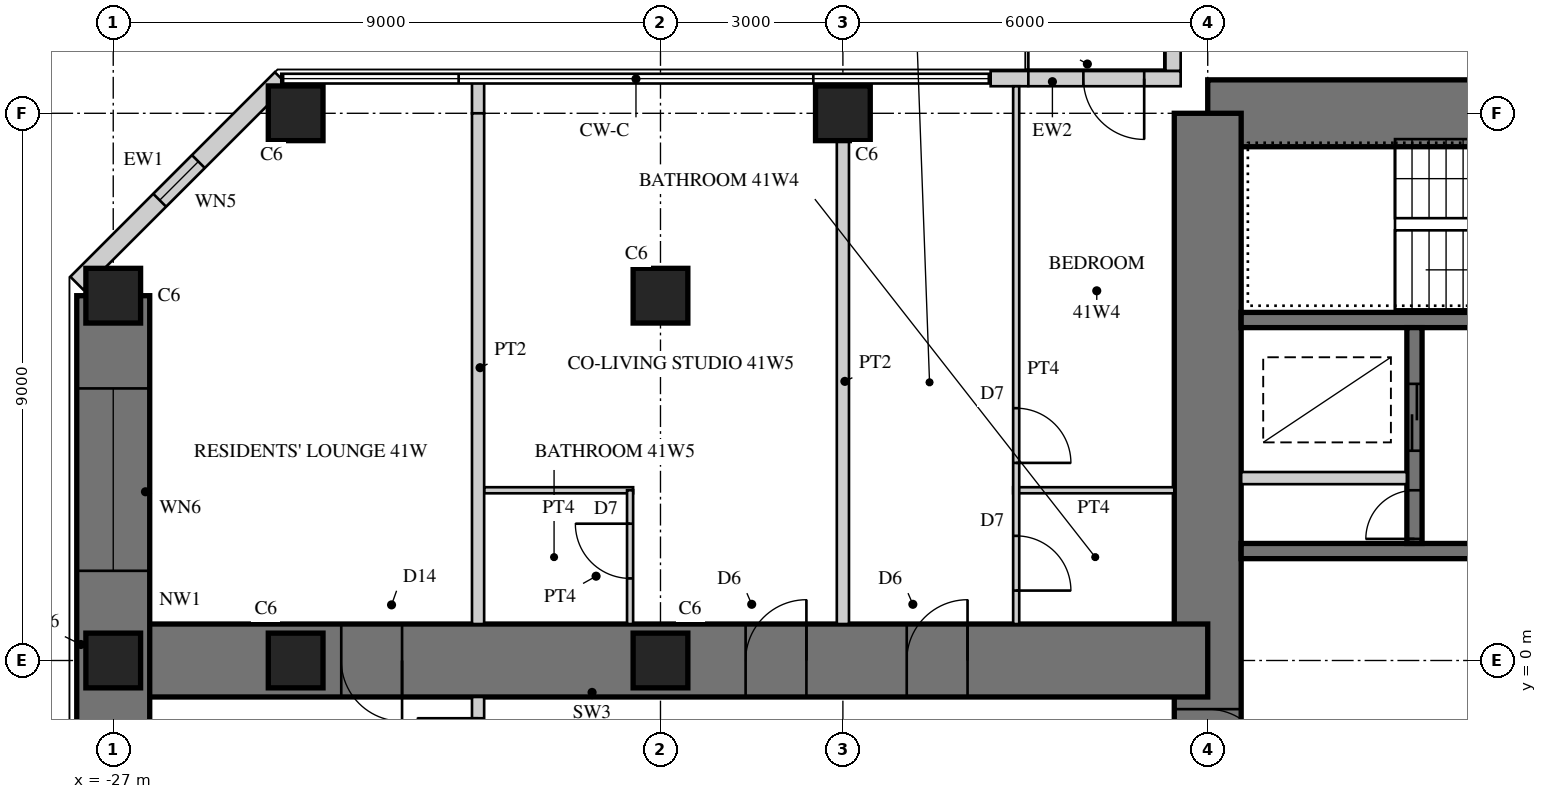
"""IFC4 building model, lengths in metres.
Left out: names, types, materials, properties, quantities, classifications, styles, units other than length and angle.
Written with IfcOpenShell. Run it as: python <this file> out.ifc"""

import sys

from ifc_helpers import new_model, si_unit, direction, frame, frame_2d, origin, origin_2d, place, context, subcontext, project, spatial, rectangle, hollow_rectangle, extrude, element, fill, save


model = new_model("IFC4")
c1 = context("Model", 3, precision=1e-05, world=origin(), true_north=direction((0.0, 1.0)))
c2 = subcontext(c1, "Body", "Model", "MODEL_VIEW")
j1 = project(units=[si_unit("LENGTHUNIT", "METRE"), si_unit("PLANEANGLEUNIT", "RADIAN")], contexts=[c1])
p1 = place(None, origin())
s1 = spatial("IfcSite", under=j1, at=p1, CompositionType="ELEMENT")
p2 = place(p1, origin())
s2 = spatial("IfcBuilding", under=s1, at=p2, CompositionType="ELEMENT")
p3 = place(p2, frame((0.0, 0.0, 169.5)))
s3 = spatial("IfcBuildingStorey", under=s2, at=p3, CompositionType="ELEMENT", Elevation=169.5)
p4 = place(p3, frame((9.0, 9.0, 0.0), z_axis=(0.0, 0.0, 1.0), x_axis=(-1.0, 0.0, 0.0)))
e1 = element("IfcWall", 1, at=p4, inside=s3, PredefinedType="SHEAR", context=c2, shape_type="SweptSolid", body=[
    extrude(rectangle(XDim=18.0, YDim=1.1, at=frame_2d((9.0, 0.0))), origin(), (0.0, 0.0, 1.0), 3.4),
])
p5 = place(p4, frame((9.8, 0.0, 0.0)))
e2 = element("IfcOpeningElement", 2, at=p5, cuts=e1, PredefinedType="OPENING", context=c2, shape_type="SweptSolid", body=[
    extrude(rectangle(XDim=1.0, YDim=2.4, at=frame_2d((0.5, 1.2))), frame((0.0, 0.56, 0.0), z_axis=(0.0, -1.0, 0.0), x_axis=(1.0, 0.0, 0.0)), (0.0, 0.0, 1.0), 1.12),
])
p6 = place(p3, frame((-9.0, 9.0, 0.0), z_axis=(0.0, 0.0, 1.0), x_axis=(0.0, -1.0, 0.0)))
e3 = element("IfcWall", 3, at=p6, inside=s3, PredefinedType="SHEAR", context=c2, shape_type="SweptSolid", body=[
    extrude(rectangle(XDim=18.0, YDim=1.1, at=frame_2d((9.0, 0.0))), origin(), (0.0, 0.0, 1.0), 3.4),
])
p7 = place(p6, frame((9.8, 0.0, 0.0)))
e4 = element("IfcOpeningElement", 4, at=p7, cuts=e3, PredefinedType="OPENING", context=c2, shape_type="SweptSolid", body=[
    extrude(rectangle(XDim=1.0, YDim=2.4, at=frame_2d((0.5, 1.2))), frame((0.0, 0.56, 0.0), z_axis=(0.0, -1.0, 0.0), x_axis=(1.0, 0.0, 0.0)), (0.0, 0.0, 1.0), 1.12),
])
p8 = place(p3, frame((-2.125, 1.8, 0.0), z_axis=(0.0, 0.0, 1.0), x_axis=(-1.0, 0.0, 0.0)))
e5 = element("IfcWall", 5, at=p8, inside=s3, PredefinedType="SHEAR", context=c2, shape_type="SweptSolid", body=[
    extrude(rectangle(XDim=6.325, YDim=0.25, at=frame_2d((3.163, 0.0))), origin(), (0.0, 0.0, 1.0), 3.4),
])
p9 = place(p3, frame((-2.125, 5.6, 0.0), z_axis=(0.0, 0.0, 1.0), x_axis=(-1.0, 0.0, 0.0)))
e6 = element("IfcWall", 6, at=p9, inside=s3, PredefinedType="SHEAR", context=c2, shape_type="SweptSolid", body=[
    extrude(rectangle(XDim=6.325, YDim=0.25, at=frame_2d((3.163, 0.0))), origin(), (0.0, 0.0, 1.0), 3.4),
])
p10 = place(p9, frame((0.175, 0.0, 0.0)))
e7 = element("IfcOpeningElement", 7, at=p10, cuts=e6, PredefinedType="OPENING", context=c2, shape_type="SweptSolid", body=[
    extrude(rectangle(XDim=1.0, YDim=2.1, at=frame_2d((0.5, 1.05))), frame((0.0, 0.135, 0.0), z_axis=(0.0, -1.0, 0.0), x_axis=(1.0, 0.0, 0.0)), (0.0, 0.0, 1.0), 0.27),
])
p11 = place(p3, frame((-5.6, 1.925, 0.0), z_axis=(0.0, 0.0, 1.0), x_axis=(0.0, 1.0, 0.0)))
e8 = element("IfcWall", 8, at=p11, inside=s3, PredefinedType="SHEAR", context=c2, shape_type="SweptSolid", body=[
    extrude(rectangle(XDim=3.55, YDim=0.25, at=frame_2d((1.775, 0.0))), origin(), (0.0, 0.0, 1.0), 3.4),
])
p12 = place(p11, frame((1.525, 0.0, 0.0)))
e9 = element("IfcOpeningElement", 9, at=p12, cuts=e8, PredefinedType="OPENING", context=c2, shape_type="SweptSolid", body=[
    extrude(rectangle(XDim=1.1, YDim=2.2, at=frame_2d((0.55, 1.1))), frame((0.0, 0.135, 0.0), z_axis=(0.0, -1.0, 0.0), x_axis=(1.0, 0.0, 0.0)), (0.0, 0.0, 1.0), 0.27),
])
p13 = place(p11, frame((0.075, 0.0, 0.0)))
e10 = element("IfcOpeningElement", 10, at=p13, cuts=e8, PredefinedType="OPENING", context=c2, shape_type="SweptSolid", body=[
    extrude(rectangle(XDim=0.8, YDim=2.1, at=frame_2d((0.4, 1.05))), frame((0.0, 0.135, 0.0), z_axis=(0.0, -1.0, 0.0), x_axis=(1.0, 0.0, 0.0)), (0.0, 0.0, 1.0), 0.27),
])
p14 = place(p3, frame((-5.725, 3.0, 0.0), z_axis=(0.0, 0.0, 1.0), x_axis=(-1.0, 0.0, 0.0)))
e11 = element("IfcWall", 11, at=p14, inside=s3, PredefinedType="PARTITIONING", context=c2, shape_type="SweptSolid", body=[
    extrude(rectangle(XDim=2.725, YDim=0.2, at=frame_2d((1.362, 0.0))), origin(), (0.0, 0.0, 1.0), 3.4),
])
p15 = place(p3, frame((-9.0, 0.0, 0.0), z_axis=(0.0, 0.0, 1.0), x_axis=(-1.0, 0.0, 0.0)))
e12 = element("IfcWall", 12, at=p15, inside=s3, PredefinedType="SHEAR", context=c2, shape_type="SweptSolid", body=[
    extrude(rectangle(XDim=18.0, YDim=1.2, at=frame_2d((9.0, 0.0))), origin(), (0.0, 0.0, 1.0), 3.4),
])
p16 = place(p15, frame((3.95, 0.0, 0.0)))
e13 = element("IfcOpeningElement", 13, at=p16, cuts=e12, PredefinedType="OPENING", context=c2, shape_type="SweptSolid", body=[
    extrude(rectangle(XDim=1.0, YDim=2.15, at=frame_2d((0.5, 1.075))), frame((0.0, 0.61, 0.0), z_axis=(0.0, -1.0, 0.0), x_axis=(1.0, 0.0, 0.0)), (0.0, 0.0, 1.0), 1.22),
])
p17 = place(p15, frame((6.6, 0.0, 0.0)))
e14 = element("IfcOpeningElement", 14, at=p17, cuts=e12, PredefinedType="OPENING", context=c2, shape_type="SweptSolid", body=[
    extrude(rectangle(XDim=1.0, YDim=2.15, at=frame_2d((0.5, 1.075))), frame((0.0, 0.61, 0.0), z_axis=(0.0, -1.0, 0.0), x_axis=(1.0, 0.0, 0.0)), (0.0, 0.0, 1.0), 1.22),
])
p18 = place(p15, frame((13.25, 0.0, 0.0)))
e15 = element("IfcOpeningElement", 15, at=p18, cuts=e12, PredefinedType="OPENING", context=c2, shape_type="SweptSolid", body=[
    extrude(rectangle(XDim=1.0, YDim=2.2, at=frame_2d((0.5, 1.1))), frame((0.0, 0.61, 0.0), z_axis=(0.0, -1.0, 0.0), x_axis=(1.0, 0.0, 0.0)), (0.0, 0.0, 1.0), 1.22),
])
p19 = place(p3, frame((-27.0, 6.0, 0.0), z_axis=(0.0, 0.0, 1.0), x_axis=(0.0, -1.0, 0.0)))
e16 = element("IfcWall", 16, at=p19, inside=s3, PredefinedType="SHEAR", context=c2, shape_type="SweptSolid", body=[
    extrude(rectangle(XDim=12.0, YDim=1.2, at=frame_2d((6.0, 0.0))), origin(), (0.0, 0.0, 1.0), 3.4),
])
p20 = place(p19, frame((1.525, 0.0, 0.6)))
e17 = element("IfcOpeningElement", 17, at=p20, cuts=e16, PredefinedType="OPENING", context=c2, shape_type="SweptSolid", body=[
    extrude(rectangle(XDim=3.0, YDim=2.4, at=frame_2d((1.5, 1.2))), frame((0.0, 0.61, 0.0), z_axis=(0.0, -1.0, 0.0), x_axis=(1.0, 0.0, 0.0)), (0.0, 0.0, 1.0), 1.22),
])
p21 = place(p19, frame((7.475, 0.0, 0.6)))
e18 = element("IfcOpeningElement", 18, at=p21, cuts=e16, PredefinedType="OPENING", context=c2, shape_type="SweptSolid", body=[
    extrude(rectangle(XDim=3.0, YDim=2.4, at=frame_2d((1.5, 1.2))), frame((0.0, 0.61, 0.0), z_axis=(0.0, -1.0, 0.0), x_axis=(1.0, 0.0, 0.0)), (0.0, 0.0, 1.0), 1.22),
])
for number, where, z_axis, x_axis in (
    (19, (-15.0, 9.0, 0.0), (0.0, 0.0, 1.0), (1.0, 0.0, 0.0)),
    (20, (-24.0, 9.0, 0.0), (0.0, 0.0, 1.0), (1.0, 0.0, 0.0)),
    (21, (-27.0, 6.0, 0.0), (0.0, 0.0, 1.0), (1.0, 0.0, 0.0)),
    (22, (-27.0, 0.0, 0.0), (0.0, 0.0, 1.0), (1.0, 0.0, 0.0)),
    (23, (-18.0, 6.0, 0.0), (0.0, 0.0, 1.0), (1.0, 0.0, 0.0)),
    (24, (-18.0, 0.0, 0.0), (0.0, 0.0, 1.0), (1.0, 0.0, 0.0)),
    (25, (-24.0, 0.0, 0.0), (0.0, 0.0, 1.0), (1.0, 0.0, 0.0)),
):
    element("IfcColumn", number, at=place(p3, frame(where, z_axis=z_axis, x_axis=x_axis)), inside=s3, PredefinedType="COLUMN", context=c2, shape_type="SweptSolid", body=[
        extrude(rectangle(XDim=0.9, YDim=0.9, at=origin_2d()), origin(), (0.0, 0.0, 1.0), 3.4),
    ])
p22 = place(p3, frame((-9.57, 12.57, 0.0), z_axis=(0.0, 0.0, 1.0), x_axis=(0.0, -1.0, 0.0)))
e26 = element("IfcWall", 26, at=p22, inside=s3, PredefinedType="SOLIDWALL", context=c2, shape_type="SweptSolid", body=[
    extrude(rectangle(XDim=2.875, YDim=0.25, at=frame_2d((1.438, 0.0))), origin(), (0.0, 0.0, 1.0), 3.22),
])
p23 = place(p22, frame((0.6, 0.0, 0.0)))
e27 = element("IfcOpeningElement", 27, at=p23, cuts=e26, PredefinedType="OPENING", context=c2, shape_type="SweptSolid", body=[
    extrude(rectangle(XDim=1.0, YDim=2.2, at=frame_2d((0.5, 1.1))), frame((0.0, 0.135, 0.0), z_axis=(0.0, -1.0, 0.0), x_axis=(1.0, 0.0, 0.0)), (0.0, 0.0, 1.0), 0.27),
])
p24 = place(p3, frame((-9.445, 9.57, 0.0), z_axis=(0.0, 0.0, 1.0), x_axis=(-1.0, 0.0, 0.0)))
e28 = element("IfcWall", 28, at=p24, inside=s3, PredefinedType="SOLIDWALL", context=c2, shape_type="SweptSolid", body=[
    extrude(rectangle(XDim=3.125, YDim=0.25, at=frame_2d((1.562, 0.0))), origin(), (0.0, 0.0, 1.0), 3.22),
])
p25 = place(p24, frame((0.6, 0.0, 0.0)))
e29 = element("IfcOpeningElement", 29, at=p25, cuts=e28, PredefinedType="OPENING", context=c2, shape_type="SweptSolid", body=[
    extrude(rectangle(XDim=1.0, YDim=2.2, at=frame_2d((0.5, 1.1))), frame((0.0, 0.135, 0.0), z_axis=(0.0, -1.0, 0.0), x_axis=(1.0, 0.0, 0.0)), (0.0, 0.0, 1.0), 0.27),
])
p26 = place(p3, frame((-24.236, 9.57, 0.0), z_axis=(0.0, 0.0, 1.0), x_axis=(-0.707106781187, -0.707106781187, 0.0)))
e30 = element("IfcWall", 30, at=p26, inside=s3, PredefinedType="SOLIDWALL", context=c2, shape_type="SweptSolid", body=[
    extrude(rectangle(XDim=4.757, YDim=0.3, at=frame_2d((2.379, 0.0))), origin(), (0.0, 0.0, 1.0), 3.22),
])
p27 = place(p26, frame((1.929, 0.0, 0.3)))
e31 = element("IfcOpeningElement", 31, at=p27, cuts=e30, PredefinedType="OPENING", context=c2, shape_type="SweptSolid", body=[
    extrude(rectangle(XDim=0.9, YDim=2.4, at=frame_2d((0.45, 1.2))), frame((0.0, 0.16, 0.0), z_axis=(0.0, -1.0, 0.0), x_axis=(1.0, 0.0, 0.0)), (0.0, 0.0, 1.0), 0.32),
])
p28 = place(p3, frame((-9.55, 2.8, 0.0), z_axis=(0.0, 0.0, 1.0), x_axis=(-1.0, 0.0, 0.0)))
e32 = element("IfcWall", 32, at=p28, inside=s3, PredefinedType="PARTITIONING", context=c2, shape_type="SweptSolid", body=[
    extrude(rectangle(XDim=2.65, YDim=0.1, at=frame_2d((1.325, 0.0))), origin(), (0.0, 0.0, 1.0), 3.22),
])
p29 = place(p3, frame((-12.15, 9.445, 0.0), z_axis=(0.0, 0.0, 1.0), x_axis=(0.0, -1.0, 0.0)))
e33 = element("IfcWall", 33, at=p29, inside=s3, PredefinedType="PARTITIONING", context=c2, shape_type="SweptSolid", body=[
    extrude(rectangle(XDim=8.845, YDim=0.1, at=frame_2d((4.422, 0.0))), origin(), (0.0, 0.0, 1.0), 3.22),
])
p30 = place(p29, frame((5.295, 0.0, 0.0)))
e34 = element("IfcOpeningElement", 34, at=p30, cuts=e33, PredefinedType="OPENING", context=c2, shape_type="SweptSolid", body=[
    extrude(rectangle(XDim=0.9, YDim=2.1, at=frame_2d((0.45, 1.05))), frame((0.0, 0.06, 0.0), z_axis=(0.0, -1.0, 0.0), x_axis=(1.0, 0.0, 0.0)), (0.0, 0.0, 1.0), 0.12),
])
p31 = place(p29, frame((7.395, 0.0, 0.0)))
e35 = element("IfcOpeningElement", 35, at=p31, cuts=e33, PredefinedType="OPENING", context=c2, shape_type="SweptSolid", body=[
    extrude(rectangle(XDim=0.9, YDim=2.1, at=frame_2d((0.45, 1.05))), frame((0.0, 0.06, 0.0), z_axis=(0.0, -1.0, 0.0), x_axis=(1.0, 0.0, 0.0)), (0.0, 0.0, 1.0), 0.12),
])
p32 = place(p3, frame((-15.0, 8.55, 0.0), z_axis=(0.0, 0.0, 1.0), x_axis=(0.0, -1.0, 0.0)))
e36 = element("IfcWall", 36, at=p32, inside=s3, PredefinedType="SOLIDWALL", context=c2, shape_type="SweptSolid", body=[
    extrude(rectangle(XDim=7.95, YDim=0.2, at=frame_2d((3.975, 0.0))), origin(), (0.0, 0.0, 1.0), 2.47),
])
p33 = place(p3, frame((-18.45, 2.8, 0.0), z_axis=(0.0, 0.0, 1.0), x_axis=(-1.0, 0.0, 0.0)))
e37 = element("IfcWall", 37, at=p33, inside=s3, PredefinedType="PARTITIONING", context=c2, shape_type="SweptSolid", body=[
    extrude(rectangle(XDim=2.45, YDim=0.1, at=frame_2d((1.225, 0.0))), origin(), (0.0, 0.0, 1.0), 3.22),
])
p34 = place(p3, frame((-18.5, 2.8, 0.0), z_axis=(0.0, 0.0, 1.0), x_axis=(0.0, -1.0, 0.0)))
e38 = element("IfcWall", 38, at=p34, inside=s3, PredefinedType="PARTITIONING", context=c2, shape_type="SweptSolid", body=[
    extrude(rectangle(XDim=2.2, YDim=0.1, at=frame_2d((1.1, 0.0))), origin(), (0.0, 0.0, 1.0), 3.22),
])
p35 = place(p34, frame((0.55, 0.0, 0.0)))
e39 = element("IfcOpeningElement", 39, at=p35, cuts=e38, PredefinedType="OPENING", context=c2, shape_type="SweptSolid", body=[
    extrude(rectangle(XDim=0.9, YDim=2.1, at=frame_2d((0.45, 1.05))), frame((0.0, 0.06, 0.0), z_axis=(0.0, -1.0, 0.0), x_axis=(1.0, 0.0, 0.0)), (0.0, 0.0, 1.0), 0.12),
])
p36 = place(p3, frame((-21.0, 9.53, 0.0), z_axis=(0.0, 0.0, 1.0), x_axis=(0.0, -1.0, 0.0)))
e40 = element("IfcWall", 40, at=p36, inside=s3, PredefinedType="SOLIDWALL", context=c2, shape_type="SweptSolid", body=[
    extrude(rectangle(XDim=0.53, YDim=0.2, at=frame_2d((0.265, 0.0))), origin(), (0.0, 0.0, 1.0), 3.22),
])
p37 = place(p3, frame((-21.0, 9.0, 0.0), z_axis=(0.0, 0.0, 1.0), x_axis=(0.0, -1.0, 0.0)))
e41 = element("IfcWall", 41, at=p37, inside=s3, PredefinedType="SOLIDWALL", context=c2, shape_type="SweptSolid", body=[
    extrude(rectangle(XDim=8.4, YDim=0.2, at=frame_2d((4.2, 0.0))), origin(), (0.0, 0.0, 1.0), 2.62),
])
p38 = place(p3, frame((-21.0, -0.6, 0.0), z_axis=(0.0, 0.0, 1.0), x_axis=(0.0, -1.0, 0.0)))
e42 = element("IfcWall", 42, at=p38, inside=s3, PredefinedType="SOLIDWALL", context=c2, shape_type="SweptSolid", body=[
    extrude(rectangle(XDim=8.4, YDim=0.2, at=frame_2d((4.2, 0.0))), origin(), (0.0, 0.0, 1.0), 2.62),
])
p39 = place(p38, frame((0.35, 0.0, 0.0)))
e43 = element("IfcOpeningElement", 43, at=p39, cuts=e42, PredefinedType="OPENING", context=c2, shape_type="SweptSolid", body=[
    extrude(rectangle(XDim=1.0, YDim=2.2, at=frame_2d((0.5, 1.1))), frame((0.0, 0.11, 0.0), z_axis=(0.0, -1.0, 0.0), x_axis=(1.0, 0.0, 0.0)), (0.0, 0.0, 1.0), 0.22),
])
p40 = place(p25, origin())
e44 = element("IfcDoor", 44, at=p40, inside=s3, OperationType="SINGLE_SWING_LEFT", PredefinedType="DOOR", context=c2, shape_type="SweptSolid", body=[
    extrude(hollow_rectangle(XDim=1.0, YDim=2.2, WallThickness=0.06, at=frame_2d((0.5, 1.1))), frame((0.0, 0.025, 0.0), z_axis=(0.0, -1.0, 0.0), x_axis=(1.0, 0.0, 0.0)), (0.0, 0.0, 1.0), 0.05),
    extrude(rectangle(XDim=0.879, YDim=2.079, at=frame_2d((0.5, 1.1))), frame((0.0, 0.025, 0.0), z_axis=(0.0, -1.0, 0.0), x_axis=(1.0, 0.0, 0.0)), (0.0, 0.0, 1.0), 0.05),
])
fill(e29, e44)
p41 = place(p27, origin())
e45 = element("IfcWindow", 45, at=p41, inside=s3, PartitioningType="SINGLE_PANEL", PredefinedType="WINDOW", context=c2, shape_type="SweptSolid", body=[
    extrude(hollow_rectangle(XDim=0.9, YDim=2.4, WallThickness=0.06, at=frame_2d((0.45, 1.2))), frame((0.0, 0.03, 0.0), z_axis=(0.0, -1.0, 0.0), x_axis=(1.0, 0.0, 0.0)), (0.0, 0.0, 1.0), 0.06),
    extrude(rectangle(XDim=0.779, YDim=2.279, at=frame_2d((0.45, 1.2))), frame((0.0, 0.03, 0.0), z_axis=(0.0, -1.0, 0.0), x_axis=(1.0, 0.0, 0.0)), (0.0, 0.0, 1.0), 0.06),
])
fill(e31, e45)
p42 = place(p20, origin())
e46 = element("IfcWindow", 46, at=p42, inside=s3, PartitioningType="SINGLE_PANEL", PredefinedType="WINDOW", context=c2, shape_type="SweptSolid", body=[
    extrude(hollow_rectangle(XDim=3.0, YDim=2.4, WallThickness=0.06, at=frame_2d((1.5, 1.2))), frame((0.0, 0.03, 0.0), z_axis=(0.0, -1.0, 0.0), x_axis=(1.0, 0.0, 0.0)), (0.0, 0.0, 1.0), 0.06),
    extrude(rectangle(XDim=2.879, YDim=2.279, at=frame_2d((1.5, 1.2))), frame((0.0, 0.03, 0.0), z_axis=(0.0, -1.0, 0.0), x_axis=(1.0, 0.0, 0.0)), (0.0, 0.0, 1.0), 0.06),
])
fill(e17, e46)
p43 = place(p30, origin())
e47 = element("IfcDoor", 47, at=p43, inside=s3, OperationType="SINGLE_SWING_RIGHT", PredefinedType="DOOR", context=c2, shape_type="SweptSolid", body=[
    extrude(rectangle(XDim=0.9, YDim=2.1, at=frame_2d((0.45, 1.05))), frame((0.0, 0.025, 0.0), z_axis=(0.0, -1.0, 0.0), x_axis=(1.0, 0.0, 0.0)), (0.0, 0.0, 1.0), 0.05),
])
fill(e34, e47)
p44 = place(p31, origin())
e48 = element("IfcDoor", 48, at=p44, inside=s3, OperationType="SINGLE_SWING_RIGHT", PredefinedType="DOOR", context=c2, shape_type="SweptSolid", body=[
    extrude(rectangle(XDim=0.9, YDim=2.1, at=frame_2d((0.45, 1.05))), frame((0.0, 0.025, 0.0), z_axis=(0.0, -1.0, 0.0), x_axis=(1.0, 0.0, 0.0)), (0.0, 0.0, 1.0), 0.05),
])
fill(e35, e48)
p45 = place(p35, frame((0.9, 0.0, 0.0), z_axis=(0.0, 0.0, 1.0), x_axis=(-1.0, 0.0, 0.0)))
e49 = element("IfcDoor", 49, at=p45, inside=s3, OperationType="SINGLE_SWING_RIGHT", PredefinedType="DOOR", context=c2, shape_type="SweptSolid", body=[
    extrude(rectangle(XDim=0.9, YDim=2.1, at=frame_2d((0.45, 1.05))), frame((0.0, 0.025, 0.0), z_axis=(0.0, -1.0, 0.0), x_axis=(1.0, 0.0, 0.0)), (0.0, 0.0, 1.0), 0.05),
])
fill(e39, e49)
p46 = place(p39, frame((1.0, 0.0, 0.0), z_axis=(0.0, 0.0, 1.0), x_axis=(-1.0, 0.0, 0.0)))
e50 = element("IfcDoor", 50, at=p46, inside=s3, OperationType="SINGLE_SWING_RIGHT", PredefinedType="DOOR", context=c2, shape_type="SweptSolid", body=[
    extrude(rectangle(XDim=1.0, YDim=2.2, at=frame_2d((0.5, 1.1))), frame((0.0, 0.025, 0.0), z_axis=(0.0, -1.0, 0.0), x_axis=(1.0, 0.0, 0.0)), (0.0, 0.0, 1.0), 0.05),
])
fill(e43, e50)
p47 = place(p16, frame((1.0, 0.0, 0.0), z_axis=(0.0, 0.0, 1.0), x_axis=(-1.0, 0.0, 0.0)))
e51 = element("IfcDoor", 51, at=p47, inside=s3, OperationType="SINGLE_SWING_RIGHT", PredefinedType="DOOR", context=c2, shape_type="SweptSolid", body=[
    extrude(rectangle(XDim=1.0, YDim=2.15, at=frame_2d((0.5, 1.075))), frame((0.0, 0.025, 0.0), z_axis=(0.0, -1.0, 0.0), x_axis=(1.0, 0.0, 0.0)), (0.0, 0.0, 1.0), 0.05),
])
fill(e13, e51)
p48 = place(p17, frame((1.0, 0.0, 0.0), z_axis=(0.0, 0.0, 1.0), x_axis=(-1.0, 0.0, 0.0)))
e52 = element("IfcDoor", 52, at=p48, inside=s3, OperationType="SINGLE_SWING_RIGHT", PredefinedType="DOOR", context=c2, shape_type="SweptSolid", body=[
    extrude(rectangle(XDim=1.0, YDim=2.15, at=frame_2d((0.5, 1.075))), frame((0.0, 0.025, 0.0), z_axis=(0.0, -1.0, 0.0), x_axis=(1.0, 0.0, 0.0)), (0.0, 0.0, 1.0), 0.05),
])
fill(e14, e52)
p49 = place(p18, origin())
e53 = element("IfcDoor", 53, at=p49, inside=s3, OperationType="SINGLE_SWING_LEFT", PredefinedType="DOOR", context=c2, shape_type="SweptSolid", body=[
    extrude(rectangle(XDim=1.0, YDim=2.2, at=frame_2d((0.5, 1.1))), frame((0.0, 0.025, 0.0), z_axis=(0.0, -1.0, 0.0), x_axis=(1.0, 0.0, 0.0)), (0.0, 0.0, 1.0), 0.05),
])
fill(e15, e53)
p50 = place(p7, origin())
e54 = element("IfcDoor", 54, at=p50, inside=s3, OperationType="SINGLE_SWING_RIGHT", PredefinedType="DOOR", context=c2, shape_type="SweptSolid", body=[
    extrude(rectangle(XDim=1.0, YDim=2.4, at=frame_2d((0.5, 1.2))), frame((0.0, 0.055, 0.0), z_axis=(0.0, -1.0, 0.0), x_axis=(1.0, 0.0, 0.0)), (0.0, 0.0, 1.0), 0.05),
])
fill(e4, e54)
p51 = place(p12, origin())
e55 = element("IfcDoor", 55, at=p51, inside=s3, OperationType="DOUBLE_DOOR_SLIDING", PredefinedType="DOOR", context=c2, shape_type="SweptSolid", body=[
    extrude(rectangle(XDim=1.1, YDim=2.2, at=frame_2d((0.55, 1.1))), frame((0.0, 0.025, 0.0), z_axis=(0.0, -1.0, 0.0), x_axis=(1.0, 0.0, 0.0)), (0.0, 0.0, 1.0), 0.05),
])
fill(e9, e55)
p52 = place(p13, origin())
e56 = element("IfcDoor", 56, at=p52, inside=s3, OperationType="SINGLE_SWING_LEFT", PredefinedType="DOOR", context=c2, shape_type="SweptSolid", body=[
    extrude(rectangle(XDim=0.8, YDim=2.1, at=frame_2d((0.4, 1.05))), frame((0.0, 0.025, 0.0), z_axis=(0.0, -1.0, 0.0), x_axis=(1.0, 0.0, 0.0)), (0.0, 0.0, 1.0), 0.05),
])
fill(e10, e56)
save(model, sys.argv[1])
